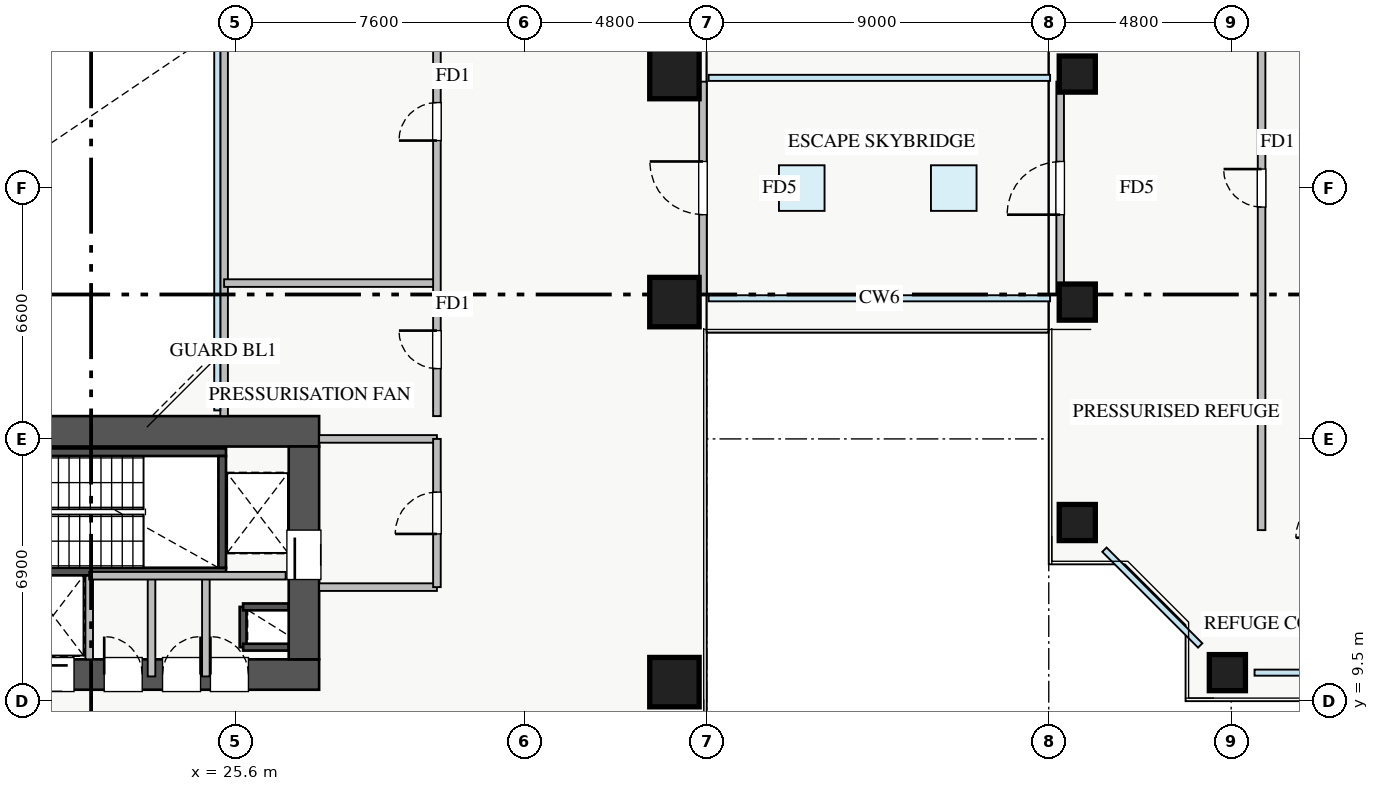
"""IFC4 building model, lengths in metres.
Left out: names, types, materials, properties, quantities, classifications, styles, units other than length and angle.
Written with IfcOpenShell. Run it as: python <this file> out.ifc"""

import sys

from ifc_helpers import new_model, si_unit, direction, frame, frame_2d, origin, origin_2d, place, context, subcontext, project, spatial, rectangle, extrude, source, transform, mapped, element, fill, save


model = new_model("IFC4")
c1 = context("Model", 3, precision=1e-05, world=origin(), true_north=direction((0.0, 1.0)))
c2 = subcontext(c1, "Body", "Model", "MODEL_VIEW")
j1 = project(units=[si_unit("LENGTHUNIT", "METRE"), si_unit("PLANEANGLEUNIT", "RADIAN")], contexts=[c1])
p1 = place(None, origin())
s1 = spatial("IfcSite", under=j1, at=p1, CompositionType="ELEMENT")
p2 = place(p1, origin())
s2 = spatial("IfcBuilding", under=s1, at=p2, CompositionType="ELEMENT")
p3 = place(p2, frame((0.0, 0.0, 45.75)))
s3 = spatial("IfcBuildingStorey", under=s2, at=p3, CompositionType="ELEMENT", Elevation=45.75)
p4 = place(p3, frame((25.8, 10.92, 0.0), z_axis=(0.0, 0.0, 1.0), x_axis=(0.0, 1.0, 0.0)))
e1 = element("IfcWall", 1, at=p4, inside=s3, PredefinedType="SHEAR", context=c2, shape_type="SweptSolid", body=[
    extrude(rectangle(XDim=1.06, YDim=0.18, at=frame_2d((0.53, 0.0))), origin(), (0.0, 0.0, 1.0), 4.32),
])
for number, where, z_axis, x_axis in (
    (2, (25.8, 11.98, 0.0), (0.0, 0.0, 1.0), (1.0, 0.0, 0.0)),
    (3, (25.8, 10.92, 0.0), (0.0, 0.0, 1.0), (1.0, 0.0, 0.0)),
):
    element("IfcWall", number, at=place(p3, frame(where, z_axis=z_axis, x_axis=x_axis)), inside=s3, PredefinedType="SHEAR", context=c2, shape_type="SweptSolid", body=[
        extrude(rectangle(XDim=1.2, YDim=0.18, at=frame_2d((0.6, 0.0))), origin(), (0.0, 0.0, 1.0), 4.32),
    ])
p5 = place(p3, frame((19.88, 12.8, 0.0), z_axis=(0.0, 0.0, 1.0), x_axis=(1.0, 0.0, 0.0)))
e4 = element("IfcWall", 4, at=p5, inside=s3, PredefinedType="SHEAR", context=c2, shape_type="SweptSolid", body=[
    extrude(rectangle(XDim=1.87, YDim=0.18, at=frame_2d((0.935, 0.0))), origin(), (0.0, 0.0, 1.0), 4.32),
])
p6 = place(p3, frame((18.2, 12.91, 0.0), z_axis=(0.0, 0.0, 1.0), x_axis=(1.0, 0.0, 0.0)))
e5 = element("IfcWall", 5, at=p6, inside=s3, PredefinedType="SHEAR", context=c2, shape_type="SweptSolid", body=[
    extrude(rectangle(XDim=7.15, YDim=0.2, at=frame_2d((3.575, 0.0))), origin(), (0.0, 0.0, 1.0), 4.5),
])
p7 = place(p6, frame((0.35, 0.0, 0.0)))
e6 = element("IfcOpeningElement", 6, at=p7, cuts=e5, PredefinedType="OPENING", context=c2, shape_type="SweptSolid", body=[
    extrude(rectangle(XDim=1.1, YDim=2.05, at=frame_2d((0.55, 1.025))), frame((0.0, 0.11, 0.0), z_axis=(0.0, -1.0, 0.0), x_axis=(1.0, 0.0, 0.0)), (0.0, 0.0, 1.0), 0.22),
])
p8 = place(p3, frame((18.2, 16.05, 0.0), z_axis=(0.0, 0.0, 1.0), x_axis=(1.0, 0.0, 0.0)))
e7 = element("IfcWall", 7, at=p8, inside=s3, PredefinedType="SHEAR", context=c2, shape_type="SweptSolid", body=[
    extrude(rectangle(XDim=7.15, YDim=0.2, at=frame_2d((3.575, 0.0))), origin(), (0.0, 0.0, 1.0), 4.5),
])
p9 = place(p3, frame((25.25, 13.01, 0.0), z_axis=(0.0, 0.0, 1.0), x_axis=(0.0, 1.0, 0.0)))
e8 = element("IfcWall", 8, at=p9, inside=s3, PredefinedType="SHEAR", context=c2, shape_type="SweptSolid", body=[
    extrude(rectangle(XDim=2.94, YDim=0.2, at=frame_2d((1.47, 0.0))), origin(), (0.0, 0.0, 1.0), 4.5),
])
p10 = place(p3, frame((10.2, 10.2, 0.0), z_axis=(0.0, 0.0, 1.0), x_axis=(1.0, 0.0, 0.0)))
e9 = element("IfcWall", 9, at=p10, inside=s3, PredefinedType="SHEAR", context=c2, shape_type="SweptSolid", body=[
    extrude(rectangle(XDim=17.6, YDim=0.8, at=frame_2d((8.8, 0.0))), origin(), (0.0, 0.0, 1.0), 4.5),
])
p11 = place(p10, frame((1.15, 0.0, 0.0)))
e10 = element("IfcOpeningElement", 10, at=p11, cuts=e9, PredefinedType="OPENING", context=c2, shape_type="SweptSolid", body=[
    extrude(rectangle(XDim=1.1, YDim=2.05, at=frame_2d((0.55, 1.025))), frame((0.0, 0.41, 0.0), z_axis=(0.0, -1.0, 0.0), x_axis=(1.0, 0.0, 0.0)), (0.0, 0.0, 1.0), 0.82),
])
p12 = place(p10, frame((8.3, 0.0, 0.0)))
e11 = element("IfcOpeningElement", 11, at=p12, cuts=e9, PredefinedType="OPENING", context=c2, shape_type="SweptSolid", body=[
    extrude(rectangle(XDim=1.1, YDim=2.05, at=frame_2d((0.55, 1.025))), frame((0.0, 0.41, 0.0), z_axis=(0.0, -1.0, 0.0), x_axis=(1.0, 0.0, 0.0)), (0.0, 0.0, 1.0), 0.82),
])
p13 = place(p10, frame((10.05, 0.0, 0.0)))
e12 = element("IfcOpeningElement", 12, at=p13, cuts=e9, PredefinedType="OPENING", context=c2, shape_type="SweptSolid", body=[
    extrude(rectangle(XDim=1.1, YDim=2.05, at=frame_2d((0.55, 1.025))), frame((0.0, 0.41, 0.0), z_axis=(0.0, -1.0, 0.0), x_axis=(1.0, 0.0, 0.0)), (0.0, 0.0, 1.0), 0.82),
])
p14 = place(p10, frame((4.9, 0.0, 0.0)))
e13 = element("IfcOpeningElement", 13, at=p14, cuts=e9, PredefinedType="OPENING", context=c2, shape_type="SweptSolid", body=[
    extrude(rectangle(XDim=1.1, YDim=2.05, at=frame_2d((0.55, 1.025))), frame((0.0, 0.41, 0.0), z_axis=(0.0, -1.0, 0.0), x_axis=(1.0, 0.0, 0.0)), (0.0, 0.0, 1.0), 0.82),
])
p15 = place(p10, frame((14.74, 0.0, 0.0)))
e14 = element("IfcOpeningElement", 14, at=p15, cuts=e9, PredefinedType="OPENING", context=c2, shape_type="SweptSolid", body=[
    extrude(rectangle(XDim=1.0, YDim=2.05, at=frame_2d((0.5, 1.025))), frame((0.0, 0.41, 0.0), z_axis=(0.0, -1.0, 0.0), x_axis=(1.0, 0.0, 0.0)), (0.0, 0.0, 1.0), 0.82),
])
p16 = place(p10, frame((11.945, 0.0, 0.0)))
e15 = element("IfcOpeningElement", 15, at=p16, cuts=e9, PredefinedType="OPENING", context=c2, shape_type="SweptSolid", body=[
    extrude(rectangle(XDim=1.0, YDim=2.05, at=frame_2d((0.5, 1.025))), frame((0.0, 0.41, 0.0), z_axis=(0.0, -1.0, 0.0), x_axis=(1.0, 0.0, 0.0)), (0.0, 0.0, 1.0), 0.82),
])
p17 = place(p10, frame((13.48, 0.0, 0.0)))
e16 = element("IfcOpeningElement", 16, at=p17, cuts=e9, PredefinedType="OPENING", context=c2, shape_type="SweptSolid", body=[
    extrude(rectangle(XDim=1.0, YDim=2.05, at=frame_2d((0.5, 1.025))), frame((0.0, 0.41, 0.0), z_axis=(0.0, -1.0, 0.0), x_axis=(1.0, 0.0, 0.0)), (0.0, 0.0, 1.0), 0.82),
])
p18 = place(p3, frame((10.2, 16.6, 0.0), z_axis=(0.0, 0.0, 1.0), x_axis=(1.0, 0.0, 0.0)))
e17 = element("IfcWall", 17, at=p18, inside=s3, PredefinedType="SHEAR", context=c2, shape_type="SweptSolid", body=[
    extrude(rectangle(XDim=17.6, YDim=0.8, at=frame_2d((8.8, 0.0))), origin(), (0.0, 0.0, 1.0), 4.5),
])
p19 = place(p3, frame((27.4, 10.6, 0.0), z_axis=(0.0, 0.0, 1.0), x_axis=(0.0, 1.0, 0.0)))
e18 = element("IfcWall", 18, at=p19, inside=s3, PredefinedType="SHEAR", context=c2, shape_type="SweptSolid", body=[
    extrude(rectangle(XDim=5.6, YDim=0.8, at=frame_2d((2.8, 0.0))), origin(), (0.0, 0.0, 1.0), 4.5),
])
p20 = place(p19, frame((2.1, 0.0, 0.0)))
e19 = element("IfcOpeningElement", 19, at=p20, cuts=e18, PredefinedType="OPENING", context=c2, shape_type="SweptSolid", body=[
    extrude(rectangle(XDim=1.3, YDim=2.05, at=frame_2d((0.65, 1.025))), frame((0.0, 0.41, 0.0), z_axis=(0.0, -1.0, 0.0), x_axis=(1.0, 0.0, 0.0)), (0.0, 0.0, 1.0), 0.82),
])
m1 = source(origin(), c2, "Body", "SweptSolid", [
    extrude(rectangle(XDim=1.3, YDim=1.3, at=origin_2d()), origin(), (0.0, 0.0, 1.0), 4.5),
])
for number, where, z_axis, x_axis in (
    (20, (37.15, 10.0, 0.0), (0.0, 0.0, 1.0), (1.0, 0.0, 0.0)),
    (21, (37.15, 20.0, 0.0), (0.0, 0.0, 1.0), (1.0, 0.0, 0.0)),
    (22, (37.15, 26.0, 0.0), (0.0, 0.0, 1.0), (1.0, 0.0, 0.0)),
):
    element("IfcColumn", number, at=place(p3, frame(where, z_axis=z_axis, x_axis=x_axis)), inside=s3, PredefinedType="COLUMN", context=c2, shape_type="MappedRepresentation", body=[
        mapped(m1, transform((0.0, 0.0, 0.0), x_axis=(1.0, 0.0, 0.0), y_axis=(0.0, 1.0, 0.0), z_axis=(0.0, 0.0, 1.0), scale=1.0)),
    ])
m2 = source(origin(), c2, "Body", "SweptSolid", [
    extrude(rectangle(XDim=0.95, YDim=0.95, at=origin_2d()), origin(), (0.0, 0.0, 1.0), 4.5),
])
for number, where, z_axis, x_axis in (
    (23, (51.7, 10.25, 0.0), (0.0, 0.0, 1.0), (1.0, 0.0, 0.0)),
    (24, (47.75, 14.2, 0.0), (0.0, 0.0, 1.0), (1.0, 0.0, 0.0)),
    (25, (47.75, 20.0, 0.0), (0.0, 0.0, 1.0), (1.0, 0.0, 0.0)),
    (26, (47.75, 26.0, 0.0), (0.0, 0.0, 1.0), (1.0, 0.0, 0.0)),
):
    element("IfcColumn", number, at=place(p3, frame(where, z_axis=z_axis, x_axis=x_axis)), inside=s3, PredefinedType="COLUMN", context=c2, shape_type="MappedRepresentation", body=[
        mapped(m2, transform((0.0, 0.0, 0.0), x_axis=(1.0, 0.0, 0.0), y_axis=(0.0, 1.0, 0.0), z_axis=(0.0, 0.0, 1.0), scale=1.0)),
    ])
for number, where, z_axis, x_axis in (
    (27, (27.8, 16.4, 0.0), (0.0, 0.0, 1.0), (1.0, 0.0, 0.0)),
    (28, (27.8, 12.5, 0.0), (0.0, 0.0, 1.0), (1.0, 0.0, 0.0)),
):
    element("IfcWall", number, at=place(p3, frame(where, z_axis=z_axis, x_axis=x_axis)), inside=s3, PredefinedType="PARTITIONING", context=c2, shape_type="SweptSolid", body=[
        extrude(rectangle(XDim=3.1, YDim=0.2, at=frame_2d((1.55, 0.0))), origin(), (0.0, 0.0, 1.0), 4.32),
    ])
p21 = place(p3, frame((30.9, 12.5, 0.0), z_axis=(0.0, 0.0, 1.0), x_axis=(0.0, 1.0, 0.0)))
e29 = element("IfcWall", 29, at=p21, inside=s3, PredefinedType="PARTITIONING", context=c2, shape_type="SweptSolid", body=[
    extrude(rectangle(XDim=3.9, YDim=0.2, at=frame_2d((1.95, 0.0))), origin(), (0.0, 0.0, 1.0), 4.32),
])
p22 = place(p21, frame((1.4, 0.0, 0.0)))
e30 = element("IfcOpeningElement", 30, at=p22, cuts=e29, PredefinedType="OPENING", context=c2, shape_type="SweptSolid", body=[
    extrude(rectangle(XDim=1.1, YDim=2.05, at=frame_2d((0.55, 1.025))), frame((0.0, 0.11, 0.0), z_axis=(0.0, -1.0, 0.0), x_axis=(1.0, 0.0, 0.0)), (0.0, 0.0, 1.0), 0.22),
])
p23 = place(p3, frame((24.82, 10.15, 0.0), z_axis=(0.0, 0.0, 1.0), x_axis=(0.0, 1.0, 0.0)))
e31 = element("IfcWall", 31, at=p23, inside=s3, PredefinedType="PARTITIONING", context=c2, shape_type="SweptSolid", body=[
    extrude(rectangle(XDim=2.65, YDim=0.2, at=frame_2d((1.325, 0.0))), origin(), (0.0, 0.0, 1.0), 4.32),
])
p24 = place(p3, frame((21.75, 10.6, 0.0), z_axis=(0.0, 0.0, 1.0), x_axis=(0.0, 1.0, 0.0)))
e32 = element("IfcWall", 32, at=p24, inside=s3, PredefinedType="PARTITIONING", context=c2, shape_type="SweptSolid", body=[
    extrude(rectangle(XDim=2.2, YDim=0.2, at=frame_2d((1.1, 0.0))), origin(), (0.0, 0.0, 1.0), 4.32),
])
p25 = place(p3, frame((23.39, 10.15, 0.0), z_axis=(0.0, 0.0, 1.0), x_axis=(0.0, 1.0, 0.0)))
e33 = element("IfcWall", 33, at=p25, inside=s3, PredefinedType="PARTITIONING", context=c2, shape_type="SweptSolid", body=[
    extrude(rectangle(XDim=2.65, YDim=0.2, at=frame_2d((1.325, 0.0))), origin(), (0.0, 0.0, 1.0), 4.32),
])
p26 = place(p3, frame((21.75, 12.8, 0.0), z_axis=(0.0, 0.0, 1.0), x_axis=(1.0, 0.0, 0.0)))
e34 = element("IfcWall", 34, at=p26, inside=s3, PredefinedType="PARTITIONING", context=c2, shape_type="SweptSolid", body=[
    extrude(rectangle(XDim=5.17, YDim=0.2, at=frame_2d((2.585, 0.0))), origin(), (0.0, 0.0, 1.0), 4.32),
])
p27 = place(p3, frame((25.3, 17.0, 0.0), z_axis=(0.0, 0.0, 1.0), x_axis=(0.0, 1.0, 0.0)))
e35 = element("IfcWall", 35, at=p27, inside=s3, PredefinedType="PARTITIONING", context=c2, shape_type="SweptSolid", body=[
    extrude(rectangle(XDim=12.0, YDim=0.2, at=frame_2d((6.0, 0.0))), origin(), (0.0, 0.0, 1.0), 3.815),
])
p28 = place(p3, frame((25.3, 20.5, 0.0), z_axis=(0.0, 0.0, 1.0), x_axis=(1.0, 0.0, 0.0)))
e36 = element("IfcWall", 36, at=p28, inside=s3, PredefinedType="PARTITIONING", context=c2, shape_type="SweptSolid", body=[
    extrude(rectangle(XDim=5.6, YDim=0.2, at=frame_2d((2.8, 0.0))), origin(), (0.0, 0.0, 1.0), 4.32),
])
p29 = place(p3, frame((30.9, 17.0, 0.0), z_axis=(0.0, 0.0, 1.0), x_axis=(0.0, 1.0, 0.0)))
e37 = element("IfcWall", 37, at=p29, inside=s3, PredefinedType="PARTITIONING", context=c2, shape_type="SweptSolid", body=[
    extrude(rectangle(XDim=12.0, YDim=0.2, at=frame_2d((6.0, 0.0))), origin(), (0.0, 0.0, 1.0), 4.32),
])
p30 = place(p29, frame((1.25, 0.0, 0.0)))
e38 = element("IfcOpeningElement", 38, at=p30, cuts=e37, PredefinedType="OPENING", context=c2, shape_type="SweptSolid", body=[
    extrude(rectangle(XDim=1.0, YDim=2.05, at=frame_2d((0.5, 1.025))), frame((0.0, 0.11, 0.0), z_axis=(0.0, -1.0, 0.0), x_axis=(1.0, 0.0, 0.0)), (0.0, 0.0, 1.0), 0.22),
])
p31 = place(p29, frame((7.25, 0.0, 0.0)))
e39 = element("IfcOpeningElement", 39, at=p31, cuts=e37, PredefinedType="OPENING", context=c2, shape_type="SweptSolid", body=[
    extrude(rectangle(XDim=1.0, YDim=2.05, at=frame_2d((0.5, 1.025))), frame((0.0, 0.11, 0.0), z_axis=(0.0, -1.0, 0.0), x_axis=(1.0, 0.0, 0.0)), (0.0, 0.0, 1.0), 0.22),
])
p32 = place(p3, frame((37.9, 20.2, 0.0), z_axis=(0.0, 0.0, 1.0), x_axis=(0.0, 1.0, 0.0)))
e40 = element("IfcWall", 40, at=p32, inside=s3, PredefinedType="PARTITIONING", context=c2, shape_type="SweptSolid", body=[
    extrude(rectangle(XDim=5.6, YDim=0.2, at=frame_2d((2.8, 0.0))), origin(), (0.0, 0.0, 1.0), 4.32),
])
p33 = place(p32, frame((2.1, 0.0, 0.0)))
e41 = element("IfcOpeningElement", 41, at=p33, cuts=e40, PredefinedType="OPENING", context=c2, shape_type="SweptSolid", body=[
    extrude(rectangle(XDim=1.4, YDim=2.05, at=frame_2d((0.7, 1.025))), frame((0.0, 0.11, 0.0), z_axis=(0.0, -1.0, 0.0), x_axis=(1.0, 0.0, 0.0)), (0.0, 0.0, 1.0), 0.22),
])
p34 = place(p3, frame((47.3, 20.2, 0.0), z_axis=(0.0, 0.0, 1.0), x_axis=(0.0, 1.0, 0.0)))
e42 = element("IfcWall", 42, at=p34, inside=s3, PredefinedType="PARTITIONING", context=c2, shape_type="SweptSolid", body=[
    extrude(rectangle(XDim=5.6, YDim=0.2, at=frame_2d((2.8, 0.0))), origin(), (0.0, 0.0, 1.0), 4.32),
])
p35 = place(p34, frame((2.1, 0.0, 0.0)))
e43 = element("IfcOpeningElement", 43, at=p35, cuts=e42, PredefinedType="OPENING", context=c2, shape_type="SweptSolid", body=[
    extrude(rectangle(XDim=1.4, YDim=2.05, at=frame_2d((0.7, 1.025))), frame((0.0, 0.11, 0.0), z_axis=(0.0, -1.0, 0.0), x_axis=(1.0, 0.0, 0.0)), (0.0, 0.0, 1.0), 0.22),
])
p36 = place(p3, frame((52.6, 14.0, 0.0), z_axis=(0.0, 0.0, 1.0), x_axis=(0.0, 1.0, 0.0)))
e44 = element("IfcWall", 44, at=p36, inside=s3, PredefinedType="PARTITIONING", context=c2, shape_type="SweptSolid", body=[
    extrude(rectangle(XDim=18.0, YDim=0.2, at=frame_2d((9.0, 0.0))), origin(), (0.0, 0.0, 1.0), 4.32),
])
p37 = place(p36, frame((8.5, 0.0, 0.0)))
e45 = element("IfcOpeningElement", 45, at=p37, cuts=e44, PredefinedType="OPENING", context=c2, shape_type="SweptSolid", body=[
    extrude(rectangle(XDim=1.0, YDim=2.05, at=frame_2d((0.5, 1.025))), frame((0.0, 0.11, 0.0), z_axis=(0.0, -1.0, 0.0), x_axis=(1.0, 0.0, 0.0)), (0.0, 0.0, 1.0), 0.22),
])
p38 = place(p3, frame((0.0, 0.0, 4.28)))
p39 = place(p38, frame((40.5, 23.0, 0.0)))
p40 = place(p39, frame((0.0, 0.0, 0.17)))
e46 = element("IfcWindow", 46, at=p40, inside=s3, PartitioningType="SINGLE_PANEL", PredefinedType="SKYLIGHT", context=c2, shape_type="SweptSolid", body=[
    extrude(rectangle(XDim=1.2, YDim=1.2, at=origin_2d()), origin(), (0.0, 0.0, 1.0), 0.05),
])
p41 = place(p38, frame((44.5, 23.0, 0.0)))
p42 = place(p41, frame((0.0, 0.0, 0.17)))
e47 = element("IfcWindow", 47, at=p42, inside=s3, PartitioningType="SINGLE_PANEL", PredefinedType="SKYLIGHT", context=c2, shape_type="SweptSolid", body=[
    extrude(rectangle(XDim=1.2, YDim=1.2, at=origin_2d()), origin(), (0.0, 0.0, 1.0), 0.05),
])
m3 = source(origin(), c2, "Body", "SweptSolid", [
    extrude(rectangle(XDim=1.3, YDim=2.05, at=frame_2d((0.65, 1.025))), frame((0.0, 0.025, 0.0), z_axis=(0.0, -1.0, 0.0), x_axis=(1.0, 0.0, 0.0)), (0.0, 0.0, 1.0), 0.05),
])
p43 = place(p20, origin())
e48 = element("IfcDoor", 48, at=p43, inside=s3, OperationType="SLIDING_TO_RIGHT", PredefinedType="DOOR", context=c2, shape_type="MappedRepresentation", body=[
    mapped(m3, transform((0.0, 0.0, 0.0), x_axis=(1.0, 0.0, 0.0), y_axis=(0.0, 1.0, 0.0), z_axis=(0.0, 0.0, 1.0), scale=1.0)),
])
fill(e19, e48)
m4 = source(origin(), c2, "Body", "SweptSolid", [
    extrude(rectangle(XDim=1.1, YDim=2.05, at=frame_2d((0.55, 1.025))), frame((0.0, 0.025, 0.0), z_axis=(0.0, -1.0, 0.0), x_axis=(1.0, 0.0, 0.0)), (0.0, 0.0, 1.0), 0.05),
])
p44 = place(p13, origin())
e49 = element("IfcDoor", 49, at=p44, inside=s3, OperationType="SLIDING_TO_RIGHT", PredefinedType="DOOR", context=c2, shape_type="MappedRepresentation", body=[
    mapped(m4, transform((0.0, 0.0, 0.0), x_axis=(1.0, 0.0, 0.0), y_axis=(0.0, 1.0, 0.0), z_axis=(0.0, 0.0, 1.0), scale=1.0)),
])
fill(e12, e49)
m5 = source(origin(), c2, "Body", "SweptSolid", [
    extrude(rectangle(XDim=1.0, YDim=2.05, at=frame_2d((0.5, 1.025))), frame((0.0, 0.025, 0.0), z_axis=(0.0, -1.0, 0.0), x_axis=(1.0, 0.0, 0.0)), (0.0, 0.0, 1.0), 0.05),
])
p45 = place(p15, origin())
e50 = element("IfcDoor", 50, at=p45, inside=s3, OperationType="SINGLE_SWING_LEFT", PredefinedType="DOOR", context=c2, shape_type="MappedRepresentation", body=[
    mapped(m5, transform((0.0, 0.0, 0.0), x_axis=(1.0, 0.0, 0.0), y_axis=(0.0, 1.0, 0.0), z_axis=(0.0, 0.0, 1.0), scale=1.0)),
])
fill(e14, e50)
p46 = place(p16, origin())
e51 = element("IfcDoor", 51, at=p46, inside=s3, OperationType="SINGLE_SWING_LEFT", PredefinedType="DOOR", context=c2, shape_type="MappedRepresentation", body=[
    mapped(m5, transform((0.0, 0.0, 0.0), x_axis=(1.0, 0.0, 0.0), y_axis=(0.0, 1.0, 0.0), z_axis=(0.0, 0.0, 1.0), scale=1.0)),
])
fill(e15, e51)
p47 = place(p17, origin())
e52 = element("IfcDoor", 52, at=p47, inside=s3, OperationType="SINGLE_SWING_RIGHT", PredefinedType="DOOR", context=c2, shape_type="MappedRepresentation", body=[
    mapped(m5, transform((0.0, 0.0, 0.0), x_axis=(1.0, 0.0, 0.0), y_axis=(0.0, 1.0, 0.0), z_axis=(0.0, 0.0, 1.0), scale=1.0)),
])
fill(e16, e52)
p48 = place(p22, origin())
e53 = element("IfcDoor", 53, at=p48, inside=s3, OperationType="SINGLE_SWING_LEFT", PredefinedType="DOOR", context=c2, shape_type="MappedRepresentation", body=[
    mapped(m4, transform((0.0, 0.0, 0.0), x_axis=(1.0, 0.0, 0.0), y_axis=(0.0, 1.0, 0.0), z_axis=(0.0, 0.0, 1.0), scale=1.0)),
])
fill(e30, e53)
p49 = place(p30, origin())
e54 = element("IfcDoor", 54, at=p49, inside=s3, OperationType="SINGLE_SWING_RIGHT", PredefinedType="DOOR", context=c2, shape_type="MappedRepresentation", body=[
    mapped(m5, transform((0.0, 0.0, 0.0), x_axis=(1.0, 0.0, 0.0), y_axis=(0.0, 1.0, 0.0), z_axis=(0.0, 0.0, 1.0), scale=1.0)),
])
fill(e38, e54)
p50 = place(p31, origin())
e55 = element("IfcDoor", 55, at=p50, inside=s3, OperationType="SINGLE_SWING_LEFT", PredefinedType="DOOR", context=c2, shape_type="MappedRepresentation", body=[
    mapped(m5, transform((0.0, 0.0, 0.0), x_axis=(1.0, 0.0, 0.0), y_axis=(0.0, 1.0, 0.0), z_axis=(0.0, 0.0, 1.0), scale=1.0)),
])
fill(e39, e55)
m6 = source(origin(), c2, "Body", "SweptSolid", [
    extrude(rectangle(XDim=1.4, YDim=2.05, at=frame_2d((0.7, 1.025))), frame((0.0, 0.025, 0.0), z_axis=(0.0, -1.0, 0.0), x_axis=(1.0, 0.0, 0.0)), (0.0, 0.0, 1.0), 0.05),
])
p51 = place(p33, origin())
e56 = element("IfcDoor", 56, at=p51, inside=s3, OperationType="SINGLE_SWING_RIGHT", PredefinedType="DOOR", context=c2, shape_type="MappedRepresentation", body=[
    mapped(m6, transform((0.0, 0.0, 0.0), x_axis=(1.0, 0.0, 0.0), y_axis=(0.0, 1.0, 0.0), z_axis=(0.0, 0.0, 1.0), scale=1.0)),
])
fill(e41, e56)
p52 = place(p35, origin())
e57 = element("IfcDoor", 57, at=p52, inside=s3, OperationType="SINGLE_SWING_LEFT", PredefinedType="DOOR", context=c2, shape_type="MappedRepresentation", body=[
    mapped(m6, transform((0.0, 0.0, 0.0), x_axis=(1.0, 0.0, 0.0), y_axis=(0.0, 1.0, 0.0), z_axis=(0.0, 0.0, 1.0), scale=1.0)),
])
fill(e43, e57)
p53 = place(p37, origin())
e58 = element("IfcDoor", 58, at=p53, inside=s3, OperationType="SINGLE_SWING_RIGHT", PredefinedType="DOOR", context=c2, shape_type="MappedRepresentation", body=[
    mapped(m5, transform((0.0, 0.0, 0.0), x_axis=(1.0, 0.0, 0.0), y_axis=(0.0, 1.0, 0.0), z_axis=(0.0, 0.0, 1.0), scale=1.0)),
])
fill(e45, e58)
save(model, sys.argv[1])
